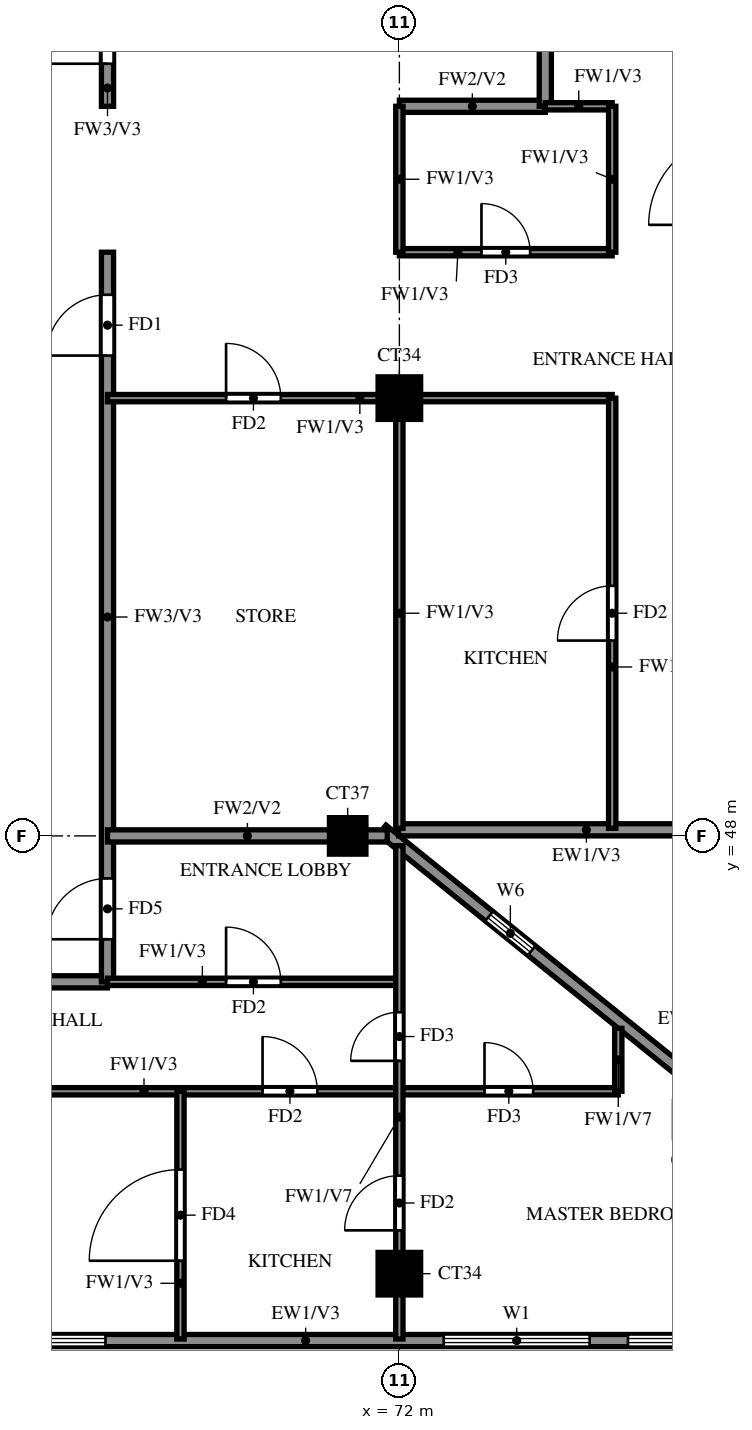
"""IFC4 building model, lengths in metres.
Left out: names, types, materials, properties, quantities, classifications, styles, units other than length and angle.
Written with IfcOpenShell. Run it as: python <this file> out.ifc"""

import sys

from ifc_helpers import new_model, si_unit, direction, frame, frame_2d, origin, origin_2d, place, context, subcontext, project, spatial, rectangle, extrude, source, transform, mapped, element, fill, save


model = new_model("IFC4")
c1 = context("Model", 3, precision=1e-05, world=origin(), true_north=direction((0.0, 1.0)))
c2 = subcontext(c1, "Body", "Model", "MODEL_VIEW")
j1 = project(units=[si_unit("LENGTHUNIT", "METRE"), si_unit("PLANEANGLEUNIT", "RADIAN")], contexts=[c1])
p1 = place(None, origin())
s1 = spatial("IfcSite", under=j1, at=p1, CompositionType="ELEMENT")
p2 = place(p1, origin())
s2 = spatial("IfcBuilding", under=s1, at=p2, CompositionType="ELEMENT")
p3 = place(p2, frame((0.0, 0.0, 257.0)))
s3 = spatial("IfcBuildingStorey", under=s2, at=p3, CompositionType="ELEMENT", Elevation=257.0)
m1 = source(origin(), c2, "Body", "SweptSolid", [
    extrude(rectangle(XDim=0.7, YDim=0.7, at=origin_2d()), origin(), (0.0, 0.0, 1.0), 3.22),
])
p4 = place(p3, frame((72.0, 40.8, 0.0), z_axis=(0.0, 0.0, 1.0), x_axis=(1.0, 0.0, 0.0)))
e1 = element("IfcColumn", 1, at=p4, inside=s3, PredefinedType="COLUMN", context=c2, shape_type="MappedRepresentation", body=[
    mapped(m1, transform((0.0, 0.0, 0.0))),
])
m2 = source(origin(), c2, "Body", "SweptSolid", [
    extrude(rectangle(XDim=0.6, YDim=0.6, at=origin_2d()), origin(), (0.0, 0.0, 1.0), 3.22),
])
p5 = place(p3, frame((71.15, 48.0, 0.0), z_axis=(0.0, 0.0, 1.0), x_axis=(1.0, 0.0, 0.0)))
e2 = element("IfcColumn", 2, at=p5, inside=s3, PredefinedType="COLUMN", context=c2, shape_type="MappedRepresentation", body=[
    mapped(m2, transform((0.0, 0.0, 0.0))),
])
p6 = place(p3, frame((72.0, 55.2, 0.0), z_axis=(0.0, 0.0, 1.0), x_axis=(1.0, 0.0, 0.0)))
e3 = element("IfcColumn", 3, at=p6, inside=s3, PredefinedType="COLUMN", context=c2, shape_type="MappedRepresentation", body=[
    mapped(m1, transform((0.0, 0.0, 0.0))),
])
p7 = place(p3, frame((81.907, 39.87, 0.0), z_axis=(0.0, 0.0, 1.0), x_axis=(-0.777936274417, 0.62834318087, 0.0)))
e4 = element("IfcWall", 4, at=p7, inside=s3, PredefinedType="SOLIDWALL", context=c2, shape_type="SweptSolid", body=[
    extrude(rectangle(XDim=13.099, YDim=0.2, at=frame_2d((6.549, 0.0))), origin(), (0.0, 0.0, 1.0), 3.22),
])
p8 = place(p7, frame((9.938, 0.0, 1.5)))
e5 = element("IfcOpeningElement", 5, at=p8, cuts=e4, PredefinedType="OPENING", context=c2, shape_type="SweptSolid", body=[
    extrude(rectangle(XDim=0.9, YDim=0.9, at=frame_2d((0.45, 0.45))), frame((0.0, 0.11, 0.0), z_axis=(0.0, -1.0, 0.0), x_axis=(1.0, 0.0, 0.0)), (0.0, 0.0, 1.0), 0.22),
])
p9 = place(p3, frame((71.987, 48.1, 0.0), z_axis=(0.0, 0.0, 1.0), x_axis=(1.0, 0.0, 0.0)))
e6 = element("IfcWall", 6, at=p9, inside=s3, PredefinedType="SOLIDWALL", context=c2, shape_type="SweptSolid", body=[
    extrude(rectangle(XDim=6.863, YDim=0.2, at=frame_2d((3.432, 0.0))), origin(), (0.0, 0.0, 1.0), 3.22),
])
p10 = place(p3, frame((58.8, 39.7, 0.0), z_axis=(0.0, 0.0, 1.0), x_axis=(1.0, 0.0, 0.0)))
e7 = element("IfcWall", 7, at=p10, inside=s3, PredefinedType="SOLIDWALL", context=c2, shape_type="SweptSolid", body=[
    extrude(rectangle(XDim=23.317, YDim=0.2, at=frame_2d((11.658, 0.0))), origin(), (0.0, 0.0, 1.0), 3.22),
])
p11 = place(p10, frame((2.433, 0.0, 0.6)))
e8 = element("IfcOpeningElement", 8, at=p11, cuts=e7, PredefinedType="OPENING", context=c2, shape_type="SweptSolid", body=[
    extrude(rectangle(XDim=2.4, YDim=2.4, at=frame_2d((1.2, 1.2))), frame((0.0, 0.11, 0.0), z_axis=(0.0, -1.0, 0.0), x_axis=(1.0, 0.0, 0.0)), (0.0, 0.0, 1.0), 0.22),
])
p12 = place(p10, frame((5.967, 0.0, 0.6)))
e9 = element("IfcOpeningElement", 9, at=p12, cuts=e7, PredefinedType="OPENING", context=c2, shape_type="SweptSolid", body=[
    extrude(rectangle(XDim=2.4, YDim=2.4, at=frame_2d((1.2, 1.2))), frame((0.0, 0.11, 0.0), z_axis=(0.0, -1.0, 0.0), x_axis=(1.0, 0.0, 0.0)), (0.0, 0.0, 1.0), 0.22),
])
p13 = place(p10, frame((13.929, 0.0, 0.6)))
e10 = element("IfcOpeningElement", 10, at=p13, cuts=e7, PredefinedType="OPENING", context=c2, shape_type="SweptSolid", body=[
    extrude(rectangle(XDim=2.4, YDim=2.4, at=frame_2d((1.2, 1.2))), frame((0.0, 0.11, 0.0), z_axis=(0.0, -1.0, 0.0), x_axis=(1.0, 0.0, 0.0)), (0.0, 0.0, 1.0), 0.22),
])
p14 = place(p10, frame((16.958, 0.0, 0.6)))
e11 = element("IfcOpeningElement", 11, at=p14, cuts=e7, PredefinedType="OPENING", context=c2, shape_type="SweptSolid", body=[
    extrude(rectangle(XDim=2.4, YDim=2.4, at=frame_2d((1.2, 1.2))), frame((0.0, 0.11, 0.0), z_axis=(0.0, -1.0, 0.0), x_axis=(1.0, 0.0, 0.0)), (0.0, 0.0, 1.0), 0.22),
])
p15 = place(p10, frame((19.988, 0.0, 0.6)))
e12 = element("IfcOpeningElement", 12, at=p15, cuts=e7, PredefinedType="OPENING", context=c2, shape_type="SweptSolid", body=[
    extrude(rectangle(XDim=2.4, YDim=2.4, at=frame_2d((1.2, 1.2))), frame((0.0, 0.11, 0.0), z_axis=(0.0, -1.0, 0.0), x_axis=(1.0, 0.0, 0.0)), (0.0, 0.0, 1.0), 0.22),
])
p16 = place(p3, frame((60.0, 45.6, 0.0), z_axis=(0.0, 0.0, 1.0), x_axis=(1.0, 0.0, 0.0)))
e13 = element("IfcWall", 13, at=p16, inside=s3, PredefinedType="SOLIDWALL", context=c2, shape_type="SweptSolid", body=[
    extrude(rectangle(XDim=7.2, YDim=0.2, at=frame_2d((3.6, 0.0))), origin(), (0.0, 0.0, 1.0), 3.22),
])
p17 = place(p3, frame((67.2, 45.6, 0.0), z_axis=(0.0, 0.0, 1.0), x_axis=(0.0, 1.0, 0.0)))
e14 = element("IfcWall", 14, at=p17, inside=s3, PredefinedType="SOLIDWALL", context=c2, shape_type="SweptSolid", body=[
    extrude(rectangle(XDim=12.0, YDim=0.2, at=frame_2d((6.0, 0.0))), origin(), (0.0, 0.0, 1.0), 3.22),
])
p18 = place(p17, frame((10.3, 0.0, 0.0)))
e15 = element("IfcOpeningElement", 15, at=p18, cuts=e14, PredefinedType="OPENING", context=c2, shape_type="SweptSolid", body=[
    extrude(rectangle(XDim=1.0, YDim=2.1, at=frame_2d((0.5, 1.05))), frame((0.0, 0.11, 0.0), z_axis=(0.0, -1.0, 0.0), x_axis=(1.0, 0.0, 0.0)), (0.0, 0.0, 1.0), 0.22),
])
p19 = place(p17, frame((0.7, 0.0, 0.0)))
e16 = element("IfcOpeningElement", 16, at=p19, cuts=e14, PredefinedType="OPENING", context=c2, shape_type="SweptSolid", body=[
    extrude(rectangle(XDim=1.0, YDim=2.1, at=frame_2d((0.5, 1.05))), frame((0.0, 0.11, 0.0), z_axis=(0.0, -1.0, 0.0), x_axis=(1.0, 0.0, 0.0)), (0.0, 0.0, 1.0), 0.22),
])
p20 = place(p3, frame((67.2, 60.0, 0.0), z_axis=(0.0, 0.0, 1.0), x_axis=(0.0, 1.0, 0.0)))
e17 = element("IfcWall", 17, at=p20, inside=s3, PredefinedType="SOLIDWALL", context=c2, shape_type="SweptSolid", body=[
    extrude(rectangle(XDim=2.4, YDim=0.2, at=frame_2d((1.2, 0.0))), origin(), (0.0, 0.0, 1.0), 3.22),
])
p21 = place(p20, frame((0.7, 0.0, 0.0)))
e18 = element("IfcOpeningElement", 18, at=p21, cuts=e17, PredefinedType="OPENING", context=c2, shape_type="SweptSolid", body=[
    extrude(rectangle(XDim=1.0, YDim=2.1, at=frame_2d((0.5, 1.05))), frame((0.0, 0.11, 0.0), z_axis=(0.0, -1.0, 0.0), x_axis=(1.0, 0.0, 0.0)), (0.0, 0.0, 1.0), 0.22),
])
p22 = place(p3, frame((67.2, 48.0, 0.0), z_axis=(0.0, 0.0, 1.0), x_axis=(1.0, 0.0, 0.0)))
e19 = element("IfcWall", 19, at=p22, inside=s3, PredefinedType="SOLIDWALL", context=c2, shape_type="SweptSolid", body=[
    extrude(rectangle(XDim=4.601, YDim=0.2, at=frame_2d((2.301, 0.0))), origin(), (0.0, 0.0, 1.0), 3.22),
])
for number, where, z_axis, x_axis in (
    (20, (72.0, 60.0, 0.0), (0.0, 0.0, 1.0), (1.0, 0.0, 0.0)),
    (21, (74.4, 60.0, 0.0), (0.0, 0.0, 1.0), (0.0, 1.0, 0.0)),
):
    element("IfcWall", number, at=place(p3, frame(where, z_axis=z_axis, x_axis=x_axis)), inside=s3, PredefinedType="SOLIDWALL", context=c2, shape_type="SweptSolid", body=[
        extrude(rectangle(XDim=2.4, YDim=0.2, at=frame_2d((1.2, 0.0))), origin(), (0.0, 0.0, 1.0), 3.22),
    ])
p23 = place(p3, frame((60.0, 43.8, 0.0), z_axis=(0.0, 0.0, 1.0), x_axis=(1.0, 0.0, 0.0)))
e22 = element("IfcWall", 22, at=p23, inside=s3, PredefinedType="PARTITIONING", context=c2, shape_type="SweptSolid", body=[
    extrude(rectangle(XDim=15.6, YDim=0.12, at=frame_2d((7.8, 0.0))), origin(), (0.0, 0.0, 1.0), 3.22),
])
p24 = place(p23, frame((9.75, 0.0, 0.0)))
e23 = element("IfcOpeningElement", 23, at=p24, cuts=e22, PredefinedType="OPENING", context=c2, shape_type="SweptSolid", body=[
    extrude(rectangle(XDim=0.9, YDim=2.1, at=frame_2d((0.45, 1.05))), frame((0.0, 0.07, 0.0), z_axis=(0.0, -1.0, 0.0), x_axis=(1.0, 0.0, 0.0)), (0.0, 0.0, 1.0), 0.14),
])
p25 = place(p23, frame((3.45, 0.0, 0.0)))
e24 = element("IfcOpeningElement", 24, at=p25, cuts=e22, PredefinedType="OPENING", context=c2, shape_type="SweptSolid", body=[
    extrude(rectangle(XDim=1.5, YDim=2.1, at=frame_2d((0.75, 1.05))), frame((0.0, 0.07, 0.0), z_axis=(0.0, -1.0, 0.0), x_axis=(1.0, 0.0, 0.0)), (0.0, 0.0, 1.0), 0.14),
])
p26 = place(p23, frame((13.4, 0.0, 0.0)))
e25 = element("IfcOpeningElement", 25, at=p26, cuts=e22, PredefinedType="OPENING", context=c2, shape_type="SweptSolid", body=[
    extrude(rectangle(XDim=0.8, YDim=2.1, at=frame_2d((0.4, 1.05))), frame((0.0, 0.07, 0.0), z_axis=(0.0, -1.0, 0.0), x_axis=(1.0, 0.0, 0.0)), (0.0, 0.0, 1.0), 0.14),
])
p27 = place(p3, frame((67.2, 45.6, 0.0), z_axis=(0.0, 0.0, 1.0), x_axis=(1.0, 0.0, 0.0)))
e26 = element("IfcWall", 26, at=p27, inside=s3, PredefinedType="PARTITIONING", context=c2, shape_type="SweptSolid", body=[
    extrude(rectangle(XDim=4.8, YDim=0.12, at=frame_2d((2.4, 0.0))), origin(), (0.0, 0.0, 1.0), 3.22),
])
p28 = place(p27, frame((1.95, 0.0, 0.0)))
e27 = element("IfcOpeningElement", 27, at=p28, cuts=e26, PredefinedType="OPENING", context=c2, shape_type="SweptSolid", body=[
    extrude(rectangle(XDim=0.9, YDim=2.1, at=frame_2d((0.45, 1.05))), frame((0.0, 0.07, 0.0), z_axis=(0.0, -1.0, 0.0), x_axis=(1.0, 0.0, 0.0)), (0.0, 0.0, 1.0), 0.14),
])
p29 = place(p3, frame((67.2, 55.2, 0.0), z_axis=(0.0, 0.0, 1.0), x_axis=(1.0, 0.0, 0.0)))
e28 = element("IfcWall", 28, at=p29, inside=s3, PredefinedType="PARTITIONING", context=c2, shape_type="SweptSolid", body=[
    extrude(rectangle(XDim=8.3, YDim=0.12, at=frame_2d((4.15, 0.0))), origin(), (0.0, 0.0, 1.0), 3.22),
])
p30 = place(p29, frame((1.95, 0.0, 0.0)))
e29 = element("IfcOpeningElement", 29, at=p30, cuts=e28, PredefinedType="OPENING", context=c2, shape_type="SweptSolid", body=[
    extrude(rectangle(XDim=0.9, YDim=2.1, at=frame_2d((0.45, 1.05))), frame((0.0, 0.07, 0.0), z_axis=(0.0, -1.0, 0.0), x_axis=(1.0, 0.0, 0.0)), (0.0, 0.0, 1.0), 0.14),
])
p31 = place(p3, frame((72.0, 57.6, 0.0), z_axis=(0.0, 0.0, 1.0), x_axis=(1.0, 0.0, 0.0)))
e30 = element("IfcWall", 30, at=p31, inside=s3, PredefinedType="PARTITIONING", context=c2, shape_type="SweptSolid", body=[
    extrude(rectangle(XDim=3.5, YDim=0.12, at=frame_2d((1.75, 0.0))), origin(), (0.0, 0.0, 1.0), 3.22),
])
p32 = place(p31, frame((1.35, 0.0, 0.0)))
e31 = element("IfcOpeningElement", 31, at=p32, cuts=e30, PredefinedType="OPENING", context=c2, shape_type="SweptSolid", body=[
    extrude(rectangle(XDim=0.8, YDim=2.1, at=frame_2d((0.4, 1.05))), frame((0.0, 0.07, 0.0), z_axis=(0.0, -1.0, 0.0), x_axis=(1.0, 0.0, 0.0)), (0.0, 0.0, 1.0), 0.14),
])
p33 = place(p3, frame((74.4, 60.0, 0.0), z_axis=(0.0, 0.0, 1.0), x_axis=(1.0, 0.0, 0.0)))
e32 = element("IfcWall", 32, at=p33, inside=s3, PredefinedType="PARTITIONING", context=c2, shape_type="SweptSolid", body=[
    extrude(rectangle(XDim=1.1, YDim=0.12, at=frame_2d((0.55, 0.0))), origin(), (0.0, 0.0, 1.0), 3.22),
])
p34 = place(p3, frame((68.4, 39.725, 0.0), z_axis=(0.0, 0.0, 1.0), x_axis=(0.0, 1.0, 0.0)))
e33 = element("IfcWall", 33, at=p34, inside=s3, PredefinedType="PARTITIONING", context=c2, shape_type="SweptSolid", body=[
    extrude(rectangle(XDim=4.075, YDim=0.12, at=frame_2d((2.038, 0.0))), origin(), (0.0, 0.0, 1.0), 3.22),
])
p35 = place(p34, frame((1.288, 0.0, 0.0)))
e34 = element("IfcOpeningElement", 34, at=p35, cuts=e33, PredefinedType="OPENING", context=c2, shape_type="SweptSolid", body=[
    extrude(rectangle(XDim=1.5, YDim=2.1, at=frame_2d((0.75, 1.05))), frame((0.0, 0.07, 0.0), z_axis=(0.0, -1.0, 0.0), x_axis=(1.0, 0.0, 0.0)), (0.0, 0.0, 1.0), 0.14),
])
p36 = place(p3, frame((72.0, 39.725, 0.0), z_axis=(0.0, 0.0, 1.0), x_axis=(0.0, 1.0, 0.0)))
e35 = element("IfcWall", 35, at=p36, inside=s3, PredefinedType="PARTITIONING", context=c2, shape_type="SweptSolid", body=[
    extrude(rectangle(XDim=8.114, YDim=0.12, at=frame_2d((4.057, 0.0))), origin(), (0.0, 0.0, 1.0), 2.32),
])
p37 = place(p36, frame((1.788, 0.0, 0.0)))
e36 = element("IfcOpeningElement", 36, at=p37, cuts=e35, PredefinedType="OPENING", context=c2, shape_type="SweptSolid", body=[
    extrude(rectangle(XDim=0.9, YDim=2.1, at=frame_2d((0.45, 1.05))), frame((0.0, 0.07, 0.0), z_axis=(0.0, -1.0, 0.0), x_axis=(1.0, 0.0, 0.0)), (0.0, 0.0, 1.0), 0.14),
])
p38 = place(p36, frame((4.575, 0.0, 0.0)))
e37 = element("IfcOpeningElement", 37, at=p38, cuts=e35, PredefinedType="OPENING", context=c2, shape_type="SweptSolid", body=[
    extrude(rectangle(XDim=0.8, YDim=2.1, at=frame_2d((0.4, 1.05))), frame((0.0, 0.07, 0.0), z_axis=(0.0, -1.0, 0.0), x_axis=(1.0, 0.0, 0.0)), (0.0, 0.0, 1.0), 0.14),
])
p39 = place(p3, frame((72.0, 48.125, 0.0), z_axis=(0.0, 0.0, 1.0), x_axis=(0.0, 1.0, 0.0)))
e38 = element("IfcWall", 38, at=p39, inside=s3, PredefinedType="PARTITIONING", context=c2, shape_type="SweptSolid", body=[
    extrude(rectangle(XDim=7.075, YDim=0.12, at=frame_2d((3.538, 0.0))), origin(), (0.0, 0.0, 1.0), 3.22),
])
p40 = place(p3, frame((72.0, 57.6, 0.0), z_axis=(0.0, 0.0, 1.0), x_axis=(0.0, 1.0, 0.0)))
e39 = element("IfcWall", 39, at=p40, inside=s3, PredefinedType="PARTITIONING", context=c2, shape_type="SweptSolid", body=[
    extrude(rectangle(XDim=2.4, YDim=0.12, at=frame_2d((1.2, 0.0))), origin(), (0.0, 0.0, 1.0), 3.22),
])
p41 = place(p3, frame((75.5, 48.125, 0.0), z_axis=(0.0, 0.0, 1.0), x_axis=(0.0, 1.0, 0.0)))
e40 = element("IfcWall", 40, at=p41, inside=s3, PredefinedType="PARTITIONING", context=c2, shape_type="SweptSolid", body=[
    extrude(rectangle(XDim=7.075, YDim=0.12, at=frame_2d((3.538, 0.0))), origin(), (0.0, 0.0, 1.0), 3.22),
])
p42 = place(p41, frame((3.087, 0.0, 0.0)))
e41 = element("IfcOpeningElement", 41, at=p42, cuts=e40, PredefinedType="OPENING", context=c2, shape_type="SweptSolid", body=[
    extrude(rectangle(XDim=0.9, YDim=2.1, at=frame_2d((0.45, 1.05))), frame((0.0, 0.07, 0.0), z_axis=(0.0, -1.0, 0.0), x_axis=(1.0, 0.0, 0.0)), (0.0, 0.0, 1.0), 0.14),
])
p43 = place(p3, frame((75.5, 57.6, 0.0), z_axis=(0.0, 0.0, 1.0), x_axis=(0.0, 1.0, 0.0)))
e42 = element("IfcWall", 42, at=p43, inside=s3, PredefinedType="PARTITIONING", context=c2, shape_type="SweptSolid", body=[
    extrude(rectangle(XDim=2.4, YDim=0.12, at=frame_2d((1.2, 0.0))), origin(), (0.0, 0.0, 1.0), 3.22),
])
p44 = place(p3, frame((75.6, 43.8, 0.0), z_axis=(0.0, 0.0, 1.0), x_axis=(0.0, 1.0, 0.0)))
e43 = element("IfcWall", 43, at=p44, inside=s3, PredefinedType="PARTITIONING", context=c2, shape_type="SweptSolid", body=[
    extrude(rectangle(XDim=1.035, YDim=0.12, at=frame_2d((0.518, 0.0))), origin(), (0.0, 0.0, 1.0), 2.32),
])
p45 = place(p8, origin())
e44 = element("IfcWindow", 44, at=p45, inside=s3, PartitioningType="SINGLE_PANEL", PredefinedType="WINDOW", context=c2, shape_type="SweptSolid", body=[
    extrude(rectangle(XDim=0.9, YDim=0.9, at=frame_2d((0.45, 0.45))), frame((0.0, 0.03, 0.0), z_axis=(0.0, -1.0, 0.0), x_axis=(1.0, 0.0, 0.0)), (0.0, 0.0, 1.0), 0.06),
])
fill(e5, e44)
p46 = place(p12, origin())
e45 = element("IfcWindow", 45, at=p46, inside=s3, PartitioningType="DOUBLE_PANEL_VERTICAL", PredefinedType="WINDOW", context=c2, shape_type="SweptSolid", body=[
    extrude(rectangle(XDim=2.4, YDim=2.4, at=frame_2d((1.2, 1.2))), frame((0.0, 0.03, 0.0), z_axis=(0.0, -1.0, 0.0), x_axis=(1.0, 0.0, 0.0)), (0.0, 0.0, 1.0), 0.06),
])
fill(e9, e45)
p47 = place(p13, origin())
e46 = element("IfcWindow", 46, at=p47, inside=s3, PartitioningType="DOUBLE_PANEL_VERTICAL", PredefinedType="WINDOW", context=c2, shape_type="SweptSolid", body=[
    extrude(rectangle(XDim=2.4, YDim=2.4, at=frame_2d((1.2, 1.2))), frame((0.0, 0.03, 0.0), z_axis=(0.0, -1.0, 0.0), x_axis=(1.0, 0.0, 0.0)), (0.0, 0.0, 1.0), 0.06),
])
fill(e10, e46)
p48 = place(p14, origin())
e47 = element("IfcWindow", 47, at=p48, inside=s3, PartitioningType="DOUBLE_PANEL_VERTICAL", PredefinedType="WINDOW", context=c2, shape_type="SweptSolid", body=[
    extrude(rectangle(XDim=2.4, YDim=2.4, at=frame_2d((1.2, 1.2))), frame((0.0, 0.03, 0.0), z_axis=(0.0, -1.0, 0.0), x_axis=(1.0, 0.0, 0.0)), (0.0, 0.0, 1.0), 0.06),
])
fill(e11, e47)
p49 = place(p18, origin())
e48 = element("IfcDoor", 48, at=p49, inside=s3, OperationType="SINGLE_SWING_RIGHT", PredefinedType="DOOR", context=c2, shape_type="SweptSolid", body=[
    extrude(rectangle(XDim=1.0, YDim=2.1, at=frame_2d((0.5, 1.05))), frame((0.0, 0.025, 0.0), z_axis=(0.0, -1.0, 0.0), x_axis=(1.0, 0.0, 0.0)), (0.0, 0.0, 1.0), 0.05),
])
fill(e15, e48)
p50 = place(p42, origin())
e49 = element("IfcDoor", 49, at=p50, inside=s3, OperationType="SINGLE_SWING_LEFT", PredefinedType="DOOR", context=c2, shape_type="SweptSolid", body=[
    extrude(rectangle(XDim=0.9, YDim=2.1, at=frame_2d((0.45, 1.05))), frame((0.0, 0.025, 0.0), z_axis=(0.0, -1.0, 0.0), x_axis=(1.0, 0.0, 0.0)), (0.0, 0.0, 1.0), 0.05),
])
fill(e41, e49)
p51 = place(p32, origin())
e50 = element("IfcDoor", 50, at=p51, inside=s3, OperationType="SINGLE_SWING_LEFT", PredefinedType="DOOR", context=c2, shape_type="SweptSolid", body=[
    extrude(rectangle(XDim=0.8, YDim=2.1, at=frame_2d((0.4, 1.05))), frame((0.0, 0.025, 0.0), z_axis=(0.0, -1.0, 0.0), x_axis=(1.0, 0.0, 0.0)), (0.0, 0.0, 1.0), 0.05),
])
fill(e31, e50)
p52 = place(p30, origin())
e51 = element("IfcDoor", 51, at=p52, inside=s3, OperationType="SINGLE_SWING_RIGHT", PredefinedType="DOOR", context=c2, shape_type="SweptSolid", body=[
    extrude(rectangle(XDim=0.9, YDim=2.1, at=frame_2d((0.45, 1.05))), frame((0.0, 0.025, 0.0), z_axis=(0.0, -1.0, 0.0), x_axis=(1.0, 0.0, 0.0)), (0.0, 0.0, 1.0), 0.05),
])
fill(e29, e51)
p53 = place(p21, origin())
e52 = element("IfcDoor", 52, at=p53, inside=s3, OperationType="SINGLE_SWING_LEFT", PredefinedType="DOOR", context=c2, shape_type="SweptSolid", body=[
    extrude(rectangle(XDim=1.0, YDim=2.1, at=frame_2d((0.5, 1.05))), frame((0.0, 0.025, 0.0), z_axis=(0.0, -1.0, 0.0), x_axis=(1.0, 0.0, 0.0)), (0.0, 0.0, 1.0), 0.05),
])
fill(e18, e52)
p54 = place(p35, origin())
e53 = element("IfcDoor", 53, at=p54, inside=s3, OperationType="SINGLE_SWING_RIGHT", PredefinedType="DOOR", context=c2, shape_type="SweptSolid", body=[
    extrude(rectangle(XDim=1.5, YDim=2.1, at=frame_2d((0.75, 1.05))), frame((0.0, 0.025, 0.0), z_axis=(0.0, -1.0, 0.0), x_axis=(1.0, 0.0, 0.0)), (0.0, 0.0, 1.0), 0.05),
])
fill(e34, e53)
p55 = place(p28, origin())
e54 = element("IfcDoor", 54, at=p55, inside=s3, OperationType="SINGLE_SWING_LEFT", PredefinedType="DOOR", context=c2, shape_type="SweptSolid", body=[
    extrude(rectangle(XDim=0.9, YDim=2.1, at=frame_2d((0.45, 1.05))), frame((0.0, 0.025, 0.0), z_axis=(0.0, -1.0, 0.0), x_axis=(1.0, 0.0, 0.0)), (0.0, 0.0, 1.0), 0.05),
])
fill(e27, e54)
p56 = place(p19, origin())
e55 = element("IfcDoor", 55, at=p56, inside=s3, OperationType="SINGLE_SWING_LEFT", PredefinedType="DOOR", context=c2, shape_type="SweptSolid", body=[
    extrude(rectangle(XDim=1.0, YDim=2.1, at=frame_2d((0.5, 1.05))), frame((0.0, 0.025, 0.0), z_axis=(0.0, -1.0, 0.0), x_axis=(1.0, 0.0, 0.0)), (0.0, 0.0, 1.0), 0.05),
])
fill(e16, e55)
p57 = place(p24, origin())
e56 = element("IfcDoor", 56, at=p57, inside=s3, OperationType="SINGLE_SWING_RIGHT", PredefinedType="DOOR", context=c2, shape_type="SweptSolid", body=[
    extrude(rectangle(XDim=0.9, YDim=2.1, at=frame_2d((0.45, 1.05))), frame((0.0, 0.025, 0.0), z_axis=(0.0, -1.0, 0.0), x_axis=(1.0, 0.0, 0.0)), (0.0, 0.0, 1.0), 0.05),
])
fill(e23, e56)
p58 = place(p37, origin())
e57 = element("IfcDoor", 57, at=p58, inside=s3, OperationType="SINGLE_SWING_RIGHT", PredefinedType="DOOR", context=c2, shape_type="SweptSolid", body=[
    extrude(rectangle(XDim=0.9, YDim=2.1, at=frame_2d((0.45, 1.05))), frame((0.0, 0.025, 0.0), z_axis=(0.0, -1.0, 0.0), x_axis=(1.0, 0.0, 0.0)), (0.0, 0.0, 1.0), 0.05),
])
fill(e36, e57)
p59 = place(p38, origin())
e58 = element("IfcDoor", 58, at=p59, inside=s3, OperationType="SINGLE_SWING_RIGHT", PredefinedType="DOOR", context=c2, shape_type="SweptSolid", body=[
    extrude(rectangle(XDim=0.8, YDim=2.1, at=frame_2d((0.4, 1.05))), frame((0.0, 0.025, 0.0), z_axis=(0.0, -1.0, 0.0), x_axis=(1.0, 0.0, 0.0)), (0.0, 0.0, 1.0), 0.05),
])
fill(e37, e58)
p60 = place(p26, origin())
e59 = element("IfcDoor", 59, at=p60, inside=s3, OperationType="SINGLE_SWING_LEFT", PredefinedType="DOOR", context=c2, shape_type="SweptSolid", body=[
    extrude(rectangle(XDim=0.8, YDim=2.1, at=frame_2d((0.4, 1.05))), frame((0.0, 0.025, 0.0), z_axis=(0.0, -1.0, 0.0), x_axis=(1.0, 0.0, 0.0)), (0.0, 0.0, 1.0), 0.05),
])
fill(e25, e59)
save(model, sys.argv[1])
